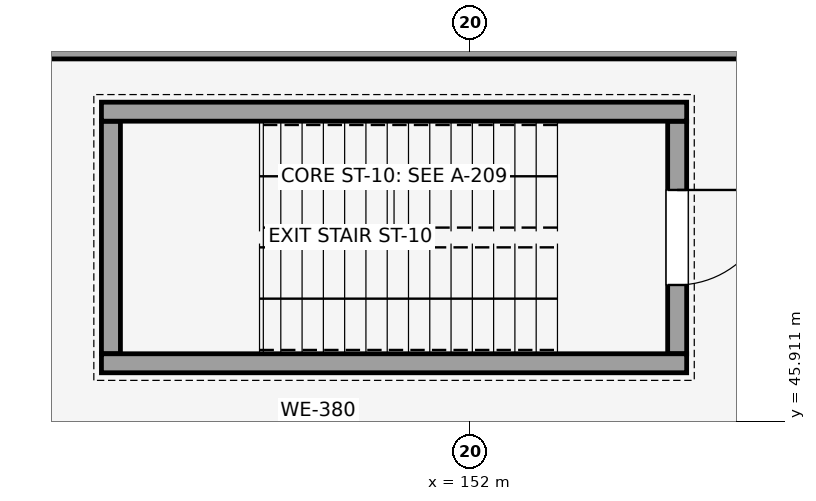
"""IFC4 building model, lengths in metres.
Left out: names, types, materials, properties, quantities, classifications, styles, units other than length and angle.
Written with IfcOpenShell. Run it as: python <this file> out.ifc"""

import sys

from ifc_helpers import new_model, si_unit, direction, frame, frame_2d, origin, place, context, subcontext, project, spatial, rectangle, extrude, element, fill, save


model = new_model("IFC4")
c1 = context("Model", 3, precision=1e-05, world=origin(), true_north=direction((0.0, 1.0)))
c2 = subcontext(c1, "Body", "Model", "MODEL_VIEW")
j1 = project(units=[si_unit("LENGTHUNIT", "METRE"), si_unit("PLANEANGLEUNIT", "RADIAN")], contexts=[c1])
p1 = place(None, origin())
s1 = spatial("IfcSite", under=j1, at=p1, CompositionType="ELEMENT")
p2 = place(p1, origin())
s2 = spatial("IfcBuilding", under=s1, at=p2, CompositionType="ELEMENT")
p3 = place(p2, frame((0.0, 0.0, 4.5)))
s3 = spatial("IfcBuildingStorey", under=s2, at=p3, CompositionType="ELEMENT", Elevation=4.5)
p4 = place(p3, frame((154.725, 49.86, 0.0), z_axis=(0.0, 0.0, 1.0), x_axis=(0.0, -1.0, 0.0)))
e1 = element("IfcWall", 1, at=p4, inside=s3, PredefinedType="SHEAR", context=c2, shape_type="SweptSolid", body=[
    extrude(rectangle(XDim=3.06, YDim=0.25, at=frame_2d((1.53, 0.0))), origin(), (0.0, 0.0, 1.0), 4.5),
])
p5 = place(p4, frame((0.905, 0.0, 0.0)))
e2 = element("IfcOpeningElement", 2, at=p5, cuts=e1, PredefinedType="OPENING", context=c2, shape_type="SweptSolid", body=[
    extrude(rectangle(XDim=1.25, YDim=2.15, at=frame_2d((0.625, 1.075))), frame((0.0, 0.135, 0.0), z_axis=(0.0, -1.0, 0.0), x_axis=(1.0, 0.0, 0.0)), (0.0, 0.0, 1.0), 0.27),
])
p6 = place(p3, frame((147.275, 49.86, 0.0), z_axis=(0.0, 0.0, 1.0), x_axis=(0.0, -1.0, 0.0)))
e3 = element("IfcWall", 3, at=p6, inside=s3, PredefinedType="SHEAR", context=c2, shape_type="SweptSolid", body=[
    extrude(rectangle(XDim=3.06, YDim=0.25, at=frame_2d((1.53, 0.0))), origin(), (0.0, 0.0, 1.0), 4.5),
])
for number, where, z_axis, x_axis in (
    (4, (154.85, 49.985, 0.0), (0.0, 0.0, 1.0), (-1.0, 0.0, 0.0)),
    (5, (154.85, 46.675, 0.0), (0.0, 0.0, 1.0), (-1.0, 0.0, 0.0)),
):
    element("IfcWall", number, at=place(p3, frame(where, z_axis=z_axis, x_axis=x_axis)), inside=s3, PredefinedType="SHEAR", context=c2, shape_type="SweptSolid", body=[
        extrude(rectangle(XDim=7.7, YDim=0.25, at=frame_2d((3.85, 0.0))), origin(), (0.0, 0.0, 1.0), 4.5),
    ])
p7 = place(p3, frame((157.0, 50.8, 0.0), z_axis=(0.0, 0.0, 1.0), x_axis=(-1.0, 0.0, 0.0)))
e6 = element("IfcWall", 6, at=p7, inside=s3, PredefinedType="SOLIDWALL", context=c2, shape_type="SweptSolid", body=[
    extrude(rectangle(XDim=12.839, YDim=0.242, at=frame_2d((6.419, 0.0))), origin(), (0.0, 0.0, 1.0), 2.7),
])
p8 = place(p5, origin())
e7 = element("IfcDoor", 7, at=p8, inside=s3, OperationType="SINGLE_SWING_LEFT", PredefinedType="DOOR", context=c2, shape_type="SweptSolid", body=[
    extrude(rectangle(XDim=1.25, YDim=2.15, at=frame_2d((0.625, 1.075))), frame((0.0, 0.025, 0.0), z_axis=(0.0, -1.0, 0.0), x_axis=(1.0, 0.0, 0.0)), (0.0, 0.0, 1.0), 0.05),
])
fill(e2, e7)
save(model, sys.argv[1])
